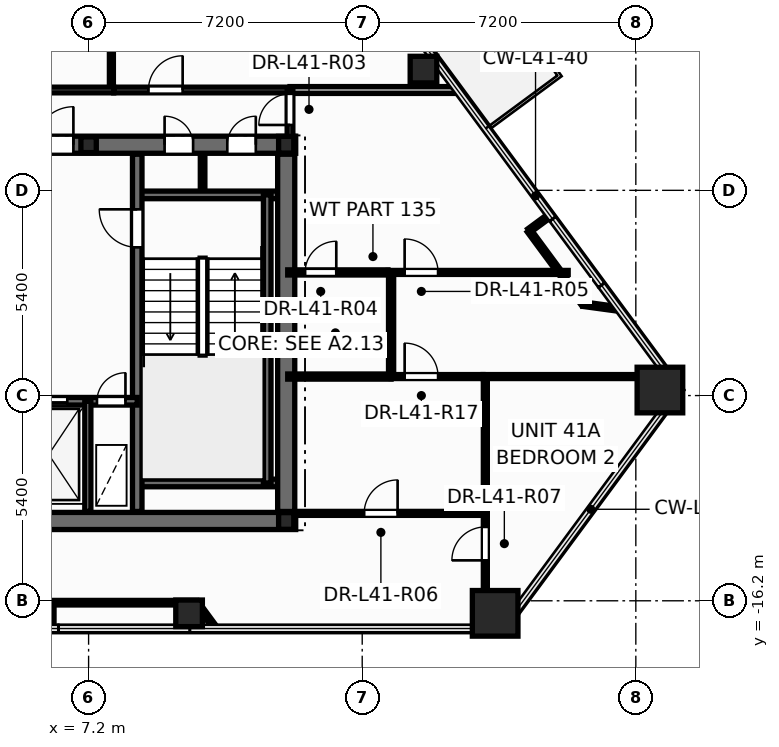
"""IFC4 building model, lengths in metres.
Left out: names, types, materials, properties, quantities, classifications, styles, units other than length and angle.
Written with IfcOpenShell. Run it as: python <this file> out.ifc"""

import sys

from ifc_helpers import new_model, si_unit, direction, frame, frame_2d, origin, origin_2d, place, context, subcontext, project, spatial, rectangle, hollow_rectangle, hollow_circle, i_section, extrude, element, fill, save


model = new_model("IFC4")
c1 = context("Model", 3, precision=1e-05, world=origin(), true_north=direction((0.0, 1.0)))
c2 = subcontext(c1, "Body", "Model", "MODEL_VIEW")
j1 = project(units=[si_unit("LENGTHUNIT", "METRE"), si_unit("PLANEANGLEUNIT", "RADIAN")], contexts=[c1])
p1 = place(None, origin())
s1 = spatial("IfcSite", under=j1, at=p1, CompositionType="ELEMENT")
p2 = place(p1, origin())
s2 = spatial("IfcBuilding", under=s1, at=p2, CompositionType="ELEMENT")
p3 = place(p2, frame((0.0, 0.0, 158.1)))
s3 = spatial("IfcBuildingStorey", under=s2, at=p3, CompositionType="ELEMENT", Elevation=158.1)
for number, where, z_axis, x_axis in (
    (1, (17.898, -16.53, 0.0), (0.0, 0.0, 1.0), (1.0, 0.0, 0.0)),
    (2, (22.234, -10.655, 0.0), (0.0, 0.0, 1.0), (1.0, 0.0, 0.0)),
):
    element("IfcColumn", number, at=place(p3, frame(where, z_axis=z_axis, x_axis=x_axis)), inside=s3, PredefinedType="COLUMN", context=c2, shape_type="SweptSolid", body=[
        extrude(hollow_rectangle(XDim=1.2, YDim=1.2, WallThickness=0.055, at=origin_2d()), origin(), (0.0, 0.0, 1.0), 3.6),
    ])
for number, where, z_axis, x_axis in (
    (3, (9.844, -16.53, 0.0), (0.0, 0.0, 1.0), (1.0, 0.0, 0.0)),
    (4, (16.012, -2.223, 0.0), (0.0, 0.0, 1.0), (1.0, 0.0, 0.0)),
):
    element("IfcColumn", number, at=place(p3, frame(where, z_axis=z_axis, x_axis=x_axis)), inside=s3, PredefinedType="COLUMN", context=c2, shape_type="SweptSolid", body=[
        extrude(hollow_circle(Radius=0.35, WallThickness=0.03, at=origin_2d()), origin(), (0.0, 0.0, 1.0), 3.6),
    ])
for number, where, z_axis, x_axis in (
    (5, (12.4, -14.1, 0.0), (0.0, 0.0, 1.0), (1.0, 0.0, 0.0)),
    (6, (12.4, -4.2, 0.0), (0.0, 0.0, 1.0), (1.0, 0.0, 0.0)),
):
    element("IfcColumn", number, at=place(p3, frame(where, z_axis=z_axis, x_axis=x_axis)), inside=s3, PredefinedType="COLUMN", context=c2, shape_type="SweptSolid", body=[
        extrude(i_section(OverallWidth=0.4, OverallDepth=0.44, WebThickness=0.028, FlangeThickness=0.04, at=origin_2d()), origin(), (0.0, 0.0, 1.0), 3.6),
    ])
p4 = place(p3, frame((7.2, -4.2, 0.0), z_axis=(0.0, 0.0, 1.0), x_axis=(1.0, 0.0, 0.0)))
e7 = element("IfcColumn", 7, at=p4, inside=s3, PredefinedType="PILASTER", context=c2, shape_type="SweptSolid", body=[
    extrude(i_section(OverallWidth=0.405, OverallDepth=0.414, WebThickness=0.022, FlangeThickness=0.032, at=origin_2d()), origin(), (0.0, 0.0, 1.0), 3.6),
])
p5 = place(p3, frame((10.2, -5.52, 0.0), z_axis=(0.0, 0.0, 1.0), x_axis=(0.0, 1.0, 0.0)))
e8 = element("IfcWall", 8, at=p5, inside=s3, PredefinedType="PARTITIONING", context=c2, shape_type="SweptSolid", body=[
    extrude(rectangle(XDim=1.12, YDim=0.12, at=frame_2d((0.56, 0.0))), origin(), (0.0, 0.0, 1.0), 3.35),
])
p6 = place(p3, frame((-12.65, -14.1, 0.0), z_axis=(0.0, 0.0, 1.0), x_axis=(1.0, 0.0, 0.0)))
e9 = element("IfcWall", 9, at=p6, inside=s3, PredefinedType="SHEAR", context=c2, shape_type="SweptSolid", body=[
    extrude(rectangle(XDim=25.3, YDim=0.45, at=frame_2d((12.65, 0.0))), origin(), (0.0, 0.0, 1.0), 3.6),
])
p7 = place(p3, frame((-12.65, -4.2, 0.0), z_axis=(0.0, 0.0, 1.0), x_axis=(1.0, 0.0, 0.0)))
e10 = element("IfcWall", 10, at=p7, inside=s3, PredefinedType="SHEAR", context=c2, shape_type="SweptSolid", body=[
    extrude(rectangle(XDim=25.3, YDim=0.45, at=frame_2d((12.65, 0.0))), origin(), (0.0, 0.0, 1.0), 3.6),
])
p8 = place(p7, frame((0.95, 0.0, 0.0)))
e11 = element("IfcOpeningElement", 11, at=p8, cuts=e10, PredefinedType="OPENING", context=c2, shape_type="SweptSolid", body=[
    extrude(rectangle(XDim=0.756, YDim=2.054, at=frame_2d((0.375, 1.027))), frame((0.0, 0.235, 0.0), z_axis=(0.0, -1.0, 0.0), x_axis=(1.0, 0.0, 0.0)), (0.0, 0.0, 1.0), 0.47),
])
p9 = place(p7, frame((2.6, 0.0, 0.0)))
e12 = element("IfcOpeningElement", 12, at=p9, cuts=e10, PredefinedType="OPENING", context=c2, shape_type="SweptSolid", body=[
    extrude(rectangle(XDim=0.756, YDim=2.054, at=frame_2d((0.375, 1.027))), frame((0.0, 0.235, 0.0), z_axis=(0.0, -1.0, 0.0), x_axis=(1.0, 0.0, 0.0)), (0.0, 0.0, 1.0), 0.47),
])
p10 = place(p7, frame((21.85, 0.0, 0.0)))
e13 = element("IfcOpeningElement", 13, at=p10, cuts=e10, PredefinedType="OPENING", context=c2, shape_type="SweptSolid", body=[
    extrude(rectangle(XDim=0.756, YDim=2.054, at=frame_2d((0.375, 1.027))), frame((0.0, 0.235, 0.0), z_axis=(0.0, -1.0, 0.0), x_axis=(1.0, 0.0, 0.0)), (0.0, 0.0, 1.0), 0.47),
])
p11 = place(p7, frame((23.5, 0.0, 0.0)))
e14 = element("IfcOpeningElement", 14, at=p11, cuts=e10, PredefinedType="OPENING", context=c2, shape_type="SweptSolid", body=[
    extrude(rectangle(XDim=0.756, YDim=2.054, at=frame_2d((0.375, 1.027))), frame((0.0, 0.235, 0.0), z_axis=(0.0, -1.0, 0.0), x_axis=(1.0, 0.0, 0.0)), (0.0, 0.0, 1.0), 0.47),
])
p12 = place(p7, frame((5.85, 0.0, 0.0)))
e15 = element("IfcOpeningElement", 15, at=p12, cuts=e10, PredefinedType="OPENING", context=c2, shape_type="SweptSolid", body=[
    extrude(rectangle(XDim=1.006, YDim=2.104, at=frame_2d((0.5, 1.052))), frame((0.0, 0.235, 0.0), z_axis=(0.0, -1.0, 0.0), x_axis=(1.0, 0.0, 0.0)), (0.0, 0.0, 1.0), 0.47),
])
p13 = place(p7, frame((10.35, 0.0, 0.0)))
e16 = element("IfcOpeningElement", 16, at=p13, cuts=e10, PredefinedType="OPENING", context=c2, shape_type="SweptSolid", body=[
    extrude(rectangle(XDim=1.406, YDim=2.154, at=frame_2d((0.7, 1.077))), frame((0.0, 0.235, 0.0), z_axis=(0.0, -1.0, 0.0), x_axis=(1.0, 0.0, 0.0)), (0.0, 0.0, 1.0), 0.47),
])
p14 = place(p7, frame((18.45, 0.0, 0.0)))
e17 = element("IfcOpeningElement", 17, at=p14, cuts=e10, PredefinedType="OPENING", context=c2, shape_type="SweptSolid", body=[
    extrude(rectangle(XDim=1.006, YDim=2.104, at=frame_2d((0.5, 1.052))), frame((0.0, 0.235, 0.0), z_axis=(0.0, -1.0, 0.0), x_axis=(1.0, 0.0, 0.0)), (0.0, 0.0, 1.0), 0.47),
])
for number, where, z_axis, x_axis in (
    (18, (8.48, -5.52, 0.0), (0.0, 0.0, 1.0), (1.0, 0.0, 0.0)),
    (19, (8.48, -13.1, 0.0), (0.0, 0.0, 1.0), (1.0, 0.0, 0.0)),
):
    element("IfcWall", number, at=place(p3, frame(where, z_axis=z_axis, x_axis=x_axis)), inside=s3, PredefinedType="SOLIDWALL", context=c2, shape_type="SweptSolid", body=[
        extrude(rectangle(XDim=3.87, YDim=0.2, at=frame_2d((1.935, 0.0))), origin(), (0.0, 0.0, 1.0), 3.6),
    ])
p15 = place(p3, frame((11.9, -13.1, 0.0), z_axis=(0.0, 0.0, 1.0), x_axis=(0.0, 1.0, 0.0)))
e20 = element("IfcWall", 20, at=p15, inside=s3, PredefinedType="SOLIDWALL", context=c2, shape_type="SweptSolid", body=[
    extrude(rectangle(XDim=7.58, YDim=0.2, at=frame_2d((3.79, 0.0))), origin(), (0.0, 0.0, 1.0), 3.6),
])
p16 = place(p3, frame((8.48, -13.85, 0.0), z_axis=(0.0, 0.0, 1.0), x_axis=(0.0, 1.0, 0.0)))
e21 = element("IfcWall", 21, at=p16, inside=s3, PredefinedType="SHEAR", context=c2, shape_type="SweptSolid", body=[
    extrude(rectangle(XDim=9.4, YDim=0.25, at=frame_2d((4.7, 0.0))), origin(), (0.0, 0.0, 1.0), 3.6),
])
p17 = place(p16, frame((6.95, 0.0, 0.0)))
e22 = element("IfcOpeningElement", 22, at=p17, cuts=e21, PredefinedType="OPENING", context=c2, shape_type="SweptSolid", body=[
    extrude(rectangle(XDim=1.006, YDim=2.104, at=frame_2d((0.5, 1.052))), frame((0.0, 0.135, 0.0), z_axis=(0.0, -1.0, 0.0), x_axis=(1.0, 0.0, 0.0)), (0.0, 0.0, 1.0), 0.27),
])
p18 = place(p3, frame((5.12, -10.95, 0.0), z_axis=(0.0, 0.0, 1.0), x_axis=(1.0, 0.0, 0.0)))
e23 = element("IfcWall", 23, at=p18, inside=s3, PredefinedType="SOLIDWALL", context=c2, shape_type="SweptSolid", body=[
    extrude(rectangle(XDim=3.36, YDim=0.2, at=frame_2d((1.68, 0.0))), origin(), (0.0, 0.0, 1.0), 3.6),
])
p19 = place(p18, frame((0.42, 0.0, 0.0)))
e24 = element("IfcOpeningElement", 24, at=p19, cuts=e23, PredefinedType="OPENING", context=c2, shape_type="SweptSolid", body=[
    extrude(rectangle(XDim=1.106, YDim=2.104, at=frame_2d((0.55, 1.052))), frame((0.0, 0.11, 0.0), z_axis=(0.0, -1.0, 0.0), x_axis=(1.0, 0.0, 0.0)), (0.0, 0.0, 1.0), 0.22),
])
p20 = place(p18, frame((2.3, 0.0, 0.0)))
e25 = element("IfcOpeningElement", 25, at=p20, cuts=e23, PredefinedType="OPENING", context=c2, shape_type="SweptSolid", body=[
    extrude(rectangle(XDim=0.756, YDim=2.054, at=frame_2d((0.375, 1.027))), frame((0.0, 0.11, 0.0), z_axis=(0.0, -1.0, 0.0), x_axis=(1.0, 0.0, 0.0)), (0.0, 0.0, 1.0), 0.22),
])
p21 = place(p3, frame((7.18, -13.85, 0.0), z_axis=(0.0, 0.0, 1.0), x_axis=(0.0, 1.0, 0.0)))
e26 = element("IfcWall", 26, at=p21, inside=s3, PredefinedType="PARTITIONING", context=c2, shape_type="SweptSolid", body=[
    extrude(rectangle(XDim=2.9, YDim=0.16, at=frame_2d((1.45, 0.0))), origin(), (0.0, 0.0, 1.0), 2.475),
])
p22 = place(p3, frame((12.4, -13.85, 0.0), z_axis=(0.0, 0.0, 1.0), x_axis=(0.0, 1.0, 0.0)))
e27 = element("IfcWall", 27, at=p22, inside=s3, PredefinedType="SHEAR", context=c2, shape_type="SweptSolid", body=[
    extrude(rectangle(XDim=9.4, YDim=0.45, at=frame_2d((4.7, 0.0))), origin(), (0.0, 0.0, 1.0), 3.6),
])
p23 = place(p3, frame((7.8, -2.76, 0.0), z_axis=(0.0, 0.0, 1.0), x_axis=(0.0, 1.0, 0.0)))
e28 = element("IfcWall", 28, at=p23, inside=s3, PredefinedType="PARTITIONING", context=c2, shape_type="SweptSolid", body=[
    extrude(rectangle(XDim=12.04, YDim=0.105, at=frame_2d((6.02, 0.0))), origin(), (0.0, 0.0, 1.0), 2.617),
])
p24 = place(p3, frame((2.36, -2.76, 0.0), z_axis=(0.0, 0.0, 1.0), x_axis=(1.0, 0.0, 0.0)))
e29 = element("IfcWall", 29, at=p24, inside=s3, PredefinedType="PARTITIONING", context=c2, shape_type="SweptSolid", body=[
    extrude(rectangle(XDim=5.5, YDim=0.15, at=frame_2d((2.75, 0.0))), origin(), (0.0, 0.0, 1.0), 2.325),
])
p25 = place(p3, frame((12.652, -13.9, 0.0), z_axis=(0.0, 0.0, 1.0), x_axis=(1.0, 0.0, 0.0)))
e30 = element("IfcWall", 30, at=p25, inside=s3, PredefinedType="PARTITIONING", context=c2, shape_type="SweptSolid", body=[
    extrude(rectangle(XDim=4.988, YDim=0.105, at=frame_2d((2.494, 0.0))), origin(), (0.0, 0.0, 1.0), 3.35),
])
p26 = place(p25, frame((1.8, 0.0, 0.0)))
e31 = element("IfcOpeningElement", 31, at=p26, cuts=e30, PredefinedType="OPENING", context=c2, shape_type="SweptSolid", body=[
    extrude(rectangle(XDim=0.886, YDim=2.104, at=frame_2d((0.44, 1.052))), frame((0.0, 0.062, 0.0), z_axis=(0.0, -1.0, 0.0), x_axis=(1.0, 0.0, 0.0)), (0.0, 0.0, 1.0), 0.125),
])
p27 = place(p3, frame((17.58, -10.3, 0.0), z_axis=(0.0, 0.0, 1.0), x_axis=(1.0, 0.0, 0.0)))
e32 = element("IfcWall", 32, at=p27, inside=s3, PredefinedType="PARTITIONING", context=c2, shape_type="SweptSolid", body=[
    extrude(rectangle(XDim=4.889, YDim=0.105, at=frame_2d((2.445, 0.0))), origin(), (0.0, 0.0, 1.0), 2.325),
])
p28 = place(p3, frame((7.862, -2.76, 0.0), z_axis=(0.0, 0.0, 1.0), x_axis=(1.0, 0.0, 0.0)))
e33 = element("IfcWall", 33, at=p28, inside=s3, PredefinedType="PARTITIONING", context=c2, shape_type="SweptSolid", body=[
    extrude(rectangle(XDim=4.638, YDim=0.15, at=frame_2d((2.319, 0.0))), origin(), (0.0, 0.0, 1.0), 3.35),
])
p29 = place(p28, frame((0.913, 0.0, 0.0)))
e34 = element("IfcOpeningElement", 34, at=p29, cuts=e33, PredefinedType="OPENING", context=c2, shape_type="SweptSolid", body=[
    extrude(rectangle(XDim=0.906, YDim=2.104, at=frame_2d((0.45, 1.052))), frame((0.0, 0.085, 0.0), z_axis=(0.0, -1.0, 0.0), x_axis=(1.0, 0.0, 0.0)), (0.0, 0.0, 1.0), 0.17),
])
p30 = place(p3, frame((15.08, -7.56, 0.0), z_axis=(0.0, 0.0, 1.0), x_axis=(1.0, 0.0, 0.0)))
e35 = element("IfcWall", 35, at=p30, inside=s3, PredefinedType="PARTITIONING", context=c2, shape_type="SweptSolid", body=[
    extrude(rectangle(XDim=4.74, YDim=0.105, at=frame_2d((2.37, 0.0))), origin(), (0.0, 0.0, 1.0), 2.325),
])
p31 = place(p30, frame((0.436, 0.0, 0.0)))
e36 = element("IfcOpeningElement", 36, at=p31, cuts=e35, PredefinedType="OPENING", context=c2, shape_type="SweptSolid", body=[
    extrude(rectangle(XDim=0.886, YDim=2.104, at=frame_2d((0.44, 1.052))), frame((0.0, 0.062, 0.0), z_axis=(0.0, -1.0, 0.0), x_axis=(1.0, 0.0, 0.0)), (0.0, 0.0, 1.0), 0.125),
])
p32 = place(p3, frame((12.5, -2.76, 0.0), z_axis=(0.0, 0.0, 1.0), x_axis=(1.0, 0.0, 0.0)))
e37 = element("IfcWall", 37, at=p32, inside=s3, PredefinedType="PARTITIONING", context=c2, shape_type="SweptSolid", body=[
    extrude(rectangle(XDim=4.405, YDim=0.18, at=frame_2d((2.203, 0.0))), origin(), (0.0, 0.0, 1.0), 2.792),
])
p33 = place(p3, frame((6.23, -16.25, 0.0), z_axis=(0.0, 0.0, 1.0), x_axis=(1.0, 0.0, 0.0)))
e38 = element("IfcWall", 38, at=p33, inside=s3, PredefinedType="PARTITIONING", context=c2, shape_type="SweptSolid", body=[
    extrude(rectangle(XDim=3.811, YDim=0.12, at=frame_2d((1.906, 0.0))), origin(), (0.0, 0.0, 1.0), 2.792),
])
p34 = place(p3, frame((17.64, -13.9, 0.0), z_axis=(0.0, 0.0, 1.0), x_axis=(0.0, 1.0, 0.0)))
e39 = element("IfcWall", 39, at=p34, inside=s3, PredefinedType="PARTITIONING", context=c2, shape_type="SweptSolid", body=[
    extrude(rectangle(XDim=3.6, YDim=0.105, at=frame_2d((1.8, 0.0))), origin(), (0.0, 0.0, 1.0), 3.35),
])
p35 = place(p3, frame((17.64, -16.93, 0.0), z_axis=(0.0, 0.0, 1.0), x_axis=(0.0, 1.0, 0.0)))
e40 = element("IfcWall", 40, at=p35, inside=s3, PredefinedType="PARTITIONING", context=c2, shape_type="SweptSolid", body=[
    extrude(rectangle(XDim=3.03, YDim=0.105, at=frame_2d((1.515, 0.0))), origin(), (0.0, 0.0, 1.0), 2.792),
])
p36 = place(p35, frame((1.794, 0.0, 0.0)))
e41 = element("IfcOpeningElement", 41, at=p36, cuts=e40, PredefinedType="OPENING", context=c2, shape_type="SweptSolid", body=[
    extrude(rectangle(XDim=0.886, YDim=2.104, at=frame_2d((0.44, 1.052))), frame((0.0, 0.062, 0.0), z_axis=(0.0, -1.0, 0.0), x_axis=(1.0, 0.0, 0.0)), (0.0, 0.0, 1.0), 0.125),
])
p37 = place(p3, frame((12.44, -7.56, 0.0), z_axis=(0.0, 0.0, 1.0), x_axis=(1.0, 0.0, 0.0)))
e42 = element("IfcWall", 42, at=p37, inside=s3, PredefinedType="PARTITIONING", context=c2, shape_type="SweptSolid", body=[
    extrude(rectangle(XDim=2.638, YDim=0.135, at=frame_2d((1.319, 0.0))), origin(), (0.0, 0.0, 1.0), 2.792),
])
p38 = place(p37, frame((0.458, 0.0, 0.0)))
e43 = element("IfcOpeningElement", 43, at=p38, cuts=e42, PredefinedType="OPENING", context=c2, shape_type="SweptSolid", body=[
    extrude(rectangle(XDim=0.826, YDim=2.104, at=frame_2d((0.41, 1.052))), frame((0.0, 0.078, 0.0), z_axis=(0.0, -1.0, 0.0), x_axis=(1.0, 0.0, 0.0)), (0.0, 0.0, 1.0), 0.155),
])
p39 = place(p3, frame((15.16, -10.3, 0.0), z_axis=(0.0, 0.0, 1.0), x_axis=(0.0, 1.0, 0.0)))
e44 = element("IfcWall", 44, at=p39, inside=s3, PredefinedType="PARTITIONING", context=c2, shape_type="SweptSolid", body=[
    extrude(rectangle(XDim=2.74, YDim=0.135, at=frame_2d((1.37, 0.0))), origin(), (0.0, 0.0, 1.0), 3.35),
])
p40 = place(p3, frame((12.44, -10.3, 0.0), z_axis=(0.0, 0.0, 1.0), x_axis=(1.0, 0.0, 0.0)))
e45 = element("IfcWall", 45, at=p40, inside=s3, PredefinedType="PARTITIONING", context=c2, shape_type="SweptSolid", body=[
    extrude(rectangle(XDim=2.72, YDim=0.135, at=frame_2d((1.36, 0.0))), origin(), (0.0, 0.0, 1.0), 2.792),
])
p41 = place(p3, frame((15.16, -10.3, 0.0), z_axis=(0.0, 0.0, 1.0), x_axis=(1.0, 0.0, 0.0)))
e46 = element("IfcWall", 46, at=p41, inside=s3, PredefinedType="PARTITIONING", context=c2, shape_type="SweptSolid", body=[
    extrude(rectangle(XDim=2.418, YDim=0.105, at=frame_2d((1.209, 0.0))), origin(), (0.0, 0.0, 1.0), 3.35),
])
p42 = place(p41, frame((0.357, 0.0, 0.0)))
e47 = element("IfcOpeningElement", 47, at=p42, cuts=e46, PredefinedType="OPENING", context=c2, shape_type="SweptSolid", body=[
    extrude(rectangle(XDim=0.886, YDim=2.104, at=frame_2d((0.44, 1.052))), frame((0.0, 0.062, 0.0), z_axis=(0.0, -1.0, 0.0), x_axis=(1.0, 0.0, 0.0)), (0.0, 0.0, 1.0), 0.125),
])
p43 = place(p3, frame((20.219, -8.396, 0.0), z_axis=(0.0, 0.0, 1.0), x_axis=(-0.593694221043, 0.804690730591, 0.0)))
e48 = element("IfcWall", 48, at=p43, inside=s3, PredefinedType="PARTITIONING", context=c2, shape_type="SweptSolid", body=[
    extrude(rectangle(XDim=2.405, YDim=0.12, at=frame_2d((1.202, 0.0))), origin(), (0.0, 0.0, 1.0), 3.35),
])
p44 = place(p3, frame((12.5, -4.24, 0.0), z_axis=(0.0, 0.0, 1.0), x_axis=(0.0, 1.0, 0.0)))
e49 = element("IfcWall", 49, at=p44, inside=s3, PredefinedType="PARTITIONING", context=c2, shape_type="SweptSolid", body=[
    extrude(rectangle(XDim=1.48, YDim=0.15, at=frame_2d((0.74, 0.0))), origin(), (0.0, 0.0, 1.0), 2.325),
])
p45 = place(p44, frame((0.56, 0.0, 0.0)))
e50 = element("IfcOpeningElement", 50, at=p45, cuts=e49, PredefinedType="OPENING", context=c2, shape_type="SweptSolid", body=[
    extrude(rectangle(XDim=0.826, YDim=2.104, at=frame_2d((0.41, 1.052))), frame((0.0, 0.085, 0.0), z_axis=(0.0, -1.0, 0.0), x_axis=(1.0, 0.0, 0.0)), (0.0, 0.0, 1.0), 0.17),
])
p46 = place(p3, frame((21.06, -8.51, 0.0), z_axis=(0.0, 0.0, 1.0), x_axis=(-0.990865129617, 0.134856571617, 0.0)))
e51 = element("IfcWall", 51, at=p46, inside=s3, PredefinedType="PARTITIONING", context=c2, shape_type="SweptSolid", body=[
    extrude(rectangle(XDim=0.849, YDim=0.12, at=frame_2d((0.425, 0.0))), origin(), (0.0, 0.0, 1.0), 2.792),
])
p47 = place(p3, frame((10.042, -16.25, 0.0), z_axis=(0.0, 0.0, 1.0), x_axis=(0.591694765298, -0.806162083405, 0.0)))
e52 = element("IfcWall", 52, at=p47, inside=s3, PredefinedType="PARTITIONING", context=c2, shape_type="SweptSolid", body=[
    extrude(rectangle(XDim=0.831, YDim=0.12, at=frame_2d((0.416, 0.0))), origin(), (0.0, 0.0, 1.0), 2.792),
])
for number, where, z_axis, x_axis in (
    (53, (6.23, -16.92, 0.0), (0.0, 0.0, 1.0), (0.0, 1.0, 0.0)),
    (54, (18.792, -6.461, 0.0), (0.0, 0.0, 1.0), (0.805, 0.594, 0.0)),
):
    element("IfcWall", number, at=place(p3, frame(where, z_axis=z_axis, x_axis=x_axis)), inside=s3, PredefinedType="PARTITIONING", context=c2, shape_type="SweptSolid", body=[
        extrude(rectangle(XDim=0.67, YDim=0.12, at=frame_2d((0.335, 0.0))), origin(), (0.0, 0.0, 1.0), 2.792),
    ])
p48 = place(p17, origin())
e55 = element("IfcDoor", 55, at=p48, inside=s3, OperationType="SINGLE_SWING_RIGHT", PredefinedType="DOOR", context=c2, shape_type="SweptSolid", body=[
    extrude(rectangle(XDim=1.0, YDim=2.1, at=frame_2d((0.5, 1.05))), frame((0.0, 0.025, 0.0), z_axis=(0.0, -1.0, 0.0), x_axis=(1.0, 0.0, 0.0)), (0.0, 0.0, 1.0), 0.05),
])
fill(e22, e55)
p49 = place(p19, origin())
e56 = element("IfcDoor", 56, at=p49, inside=s3, OperationType="DOUBLE_DOOR_SLIDING", PredefinedType="DOOR", context=c2, shape_type="SweptSolid", body=[
    extrude(rectangle(XDim=1.1, YDim=2.1, at=frame_2d((0.55, 1.05))), frame((0.0, 0.025, 0.0), z_axis=(0.0, -1.0, 0.0), x_axis=(1.0, 0.0, 0.0)), (0.0, 0.0, 1.0), 0.05),
])
fill(e24, e56)
p50 = place(p20, origin())
e57 = element("IfcDoor", 57, at=p50, inside=s3, OperationType="SINGLE_SWING_RIGHT", PredefinedType="DOOR", context=c2, shape_type="SweptSolid", body=[
    extrude(rectangle(XDim=0.75, YDim=2.05, at=frame_2d((0.375, 1.025))), frame((0.0, 0.025, 0.0), z_axis=(0.0, -1.0, 0.0), x_axis=(1.0, 0.0, 0.0)), (0.0, 0.0, 1.0), 0.05),
])
fill(e25, e57)
p51 = place(p10, origin())
e58 = element("IfcDoor", 58, at=p51, inside=s3, OperationType="SINGLE_SWING_LEFT", PredefinedType="DOOR", context=c2, shape_type="SweptSolid", body=[
    extrude(rectangle(XDim=0.75, YDim=2.05, at=frame_2d((0.375, 1.025))), frame((0.0, 0.025, 0.0), z_axis=(0.0, -1.0, 0.0), x_axis=(1.0, 0.0, 0.0)), (0.0, 0.0, 1.0), 0.05),
])
fill(e13, e58)
p52 = place(p11, origin())
e59 = element("IfcDoor", 59, at=p52, inside=s3, OperationType="SINGLE_SWING_RIGHT", PredefinedType="DOOR", context=c2, shape_type="SweptSolid", body=[
    extrude(rectangle(XDim=0.75, YDim=2.05, at=frame_2d((0.375, 1.025))), frame((0.0, 0.025, 0.0), z_axis=(0.0, -1.0, 0.0), x_axis=(1.0, 0.0, 0.0)), (0.0, 0.0, 1.0), 0.05),
])
fill(e14, e59)
p53 = place(p14, origin())
e60 = element("IfcDoor", 60, at=p53, inside=s3, OperationType="SINGLE_SWING_RIGHT", PredefinedType="DOOR", context=c2, shape_type="SweptSolid", body=[
    extrude(rectangle(XDim=1.0, YDim=2.1, at=frame_2d((0.5, 1.05))), frame((0.0, 0.025, 0.0), z_axis=(0.0, -1.0, 0.0), x_axis=(1.0, 0.0, 0.0)), (0.0, 0.0, 1.0), 0.05),
])
fill(e17, e60)
p54 = place(p45, origin())
e61 = element("IfcDoor", 61, at=p54, inside=s3, OperationType="SINGLE_SWING_LEFT", PredefinedType="DOOR", context=c2, shape_type="SweptSolid", body=[
    extrude(rectangle(XDim=0.82, YDim=2.1, at=frame_2d((0.41, 1.05))), frame((0.0, 0.025, 0.0), z_axis=(0.0, -1.0, 0.0), x_axis=(1.0, 0.0, 0.0)), (0.0, 0.0, 1.0), 0.05),
])
fill(e50, e61)
p55 = place(p38, origin())
e62 = element("IfcDoor", 62, at=p55, inside=s3, OperationType="SINGLE_SWING_RIGHT", PredefinedType="DOOR", context=c2, shape_type="SweptSolid", body=[
    extrude(rectangle(XDim=0.82, YDim=2.1, at=frame_2d((0.41, 1.05))), frame((0.0, 0.025, 0.0), z_axis=(0.0, -1.0, 0.0), x_axis=(1.0, 0.0, 0.0)), (0.0, 0.0, 1.0), 0.05),
])
fill(e43, e62)
p56 = place(p31, origin())
e63 = element("IfcDoor", 63, at=p56, inside=s3, OperationType="SINGLE_SWING_LEFT", PredefinedType="DOOR", context=c2, shape_type="SweptSolid", body=[
    extrude(rectangle(XDim=0.88, YDim=2.1, at=frame_2d((0.44, 1.05))), frame((0.0, 0.025, 0.0), z_axis=(0.0, -1.0, 0.0), x_axis=(1.0, 0.0, 0.0)), (0.0, 0.0, 1.0), 0.05),
])
fill(e36, e63)
p57 = place(p26, origin())
e64 = element("IfcDoor", 64, at=p57, inside=s3, OperationType="SINGLE_SWING_RIGHT", PredefinedType="DOOR", context=c2, shape_type="SweptSolid", body=[
    extrude(rectangle(XDim=0.88, YDim=2.1, at=frame_2d((0.44, 1.05))), frame((0.0, 0.025, 0.0), z_axis=(0.0, -1.0, 0.0), x_axis=(1.0, 0.0, 0.0)), (0.0, 0.0, 1.0), 0.05),
])
fill(e31, e64)
p58 = place(p36, origin())
e65 = element("IfcDoor", 65, at=p58, inside=s3, OperationType="SINGLE_SWING_LEFT", PredefinedType="DOOR", context=c2, shape_type="SweptSolid", body=[
    extrude(rectangle(XDim=0.88, YDim=2.1, at=frame_2d((0.44, 1.05))), frame((0.0, 0.025, 0.0), z_axis=(0.0, -1.0, 0.0), x_axis=(1.0, 0.0, 0.0)), (0.0, 0.0, 1.0), 0.05),
])
fill(e41, e65)
p59 = place(p29, origin())
e66 = element("IfcDoor", 66, at=p59, inside=s3, OperationType="SINGLE_SWING_RIGHT", PredefinedType="DOOR", context=c2, shape_type="SweptSolid", body=[
    extrude(rectangle(XDim=0.9, YDim=2.1, at=frame_2d((0.45, 1.05))), frame((0.0, 0.025, 0.0), z_axis=(0.0, -1.0, 0.0), x_axis=(1.0, 0.0, 0.0)), (0.0, 0.0, 1.0), 0.05),
])
fill(e34, e66)
p60 = place(p42, origin())
e67 = element("IfcDoor", 67, at=p60, inside=s3, OperationType="SINGLE_SWING_LEFT", PredefinedType="DOOR", context=c2, shape_type="SweptSolid", body=[
    extrude(rectangle(XDim=0.88, YDim=2.1, at=frame_2d((0.44, 1.05))), frame((0.0, 0.025, 0.0), z_axis=(0.0, -1.0, 0.0), x_axis=(1.0, 0.0, 0.0)), (0.0, 0.0, 1.0), 0.05),
])
fill(e47, e67)
save(model, sys.argv[1])
